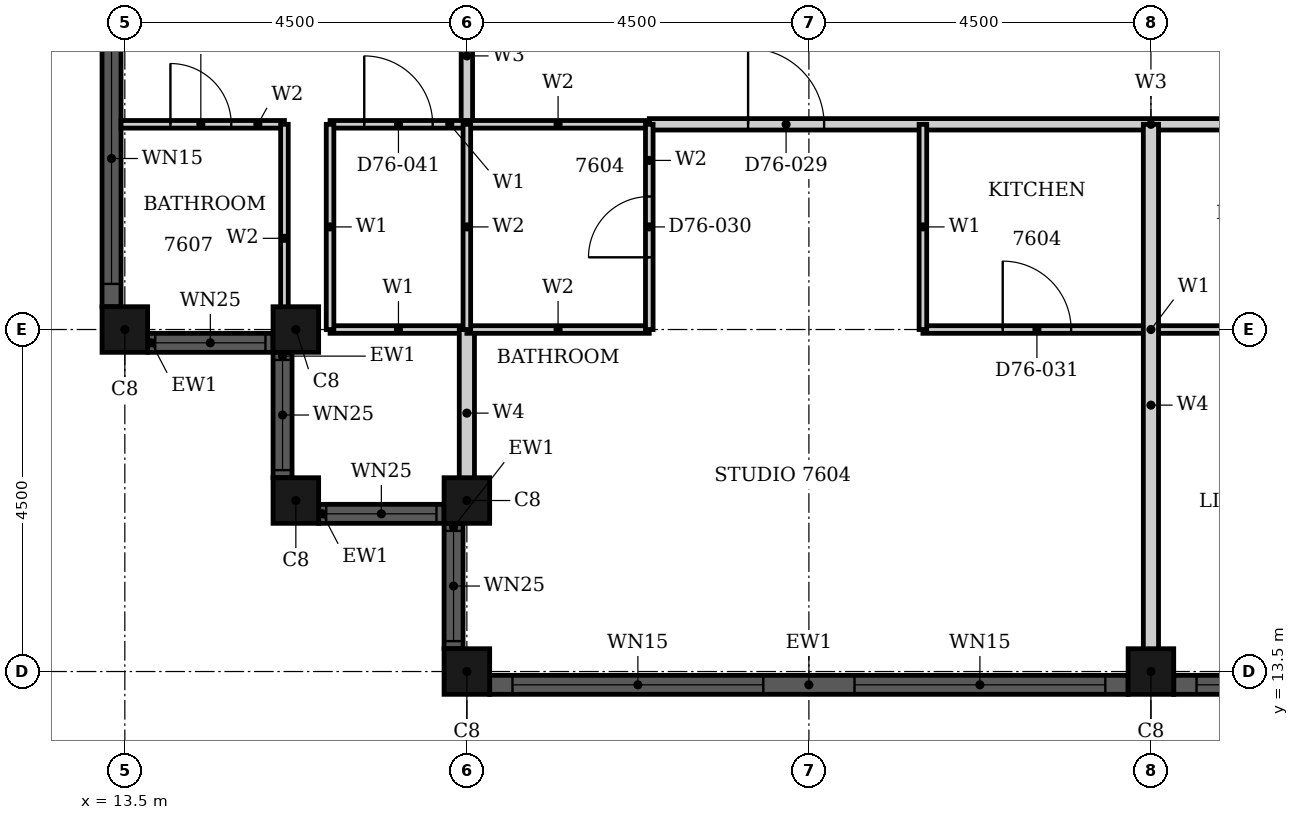
"""IFC4 building model, lengths in metres.
Left out: names, types, materials, properties, quantities, classifications, styles, units other than length and angle.
Written with IfcOpenShell. Run it as: python <this file> out.ifc"""

import sys

from ifc_helpers import new_model, si_unit, direction, frame, frame_2d, origin, origin_2d, place, context, subcontext, project, spatial, rectangle, hollow_rectangle, extrude, element, fill, save


model = new_model("IFC4")
c1 = context("Model", 3, precision=1e-05, world=origin(), true_north=direction((0.0, 1.0)))
c2 = subcontext(c1, "Body", "Model", "MODEL_VIEW")
j1 = project(units=[si_unit("LENGTHUNIT", "METRE"), si_unit("PLANEANGLEUNIT", "RADIAN")], contexts=[c1])
p1 = place(None, origin())
s1 = spatial("IfcSite", under=j1, at=p1, CompositionType="ELEMENT")
p2 = place(p1, origin())
s2 = spatial("IfcBuilding", under=s1, at=p2, CompositionType="ELEMENT")
p3 = place(p2, frame((0.0, 0.0, 298.2)))
s3 = spatial("IfcBuildingStorey", under=s2, at=p3, CompositionType="ELEMENT", Elevation=298.2)
for number, where, z_axis, x_axis in (
    (1, (13.5, 18.0, 0.0), (0.0, 0.0, 1.0), (1.0, 0.0, 0.0)),
    (2, (15.75, 18.0, 0.0), (0.0, 0.0, 1.0), (1.0, 0.0, 0.0)),
    (3, (15.75, 15.75, 0.0), (0.0, 0.0, 1.0), (1.0, 0.0, 0.0)),
    (4, (18.0, 15.75, 0.0), (0.0, 0.0, 1.0), (1.0, 0.0, 0.0)),
    (5, (18.0, 13.5, 0.0), (0.0, 0.0, 1.0), (1.0, 0.0, 0.0)),
    (6, (27.0, 13.5, 0.0), (0.0, 0.0, 1.0), (1.0, 0.0, 0.0)),
):
    element("IfcColumn", number, at=place(p3, frame(where, z_axis=z_axis, x_axis=x_axis)), inside=s3, PredefinedType="COLUMN", context=c2, shape_type="SweptSolid", body=[
        extrude(hollow_rectangle(XDim=0.6, YDim=0.6, WallThickness=0.02, at=origin_2d()), origin(), (0.0, 0.0, 1.0), 3.7),
    ])
p4 = place(p3, frame((13.325, 26.7, 0.0), z_axis=(0.0, 0.0, 1.0), x_axis=(0.0, -1.0, 0.0)))
e7 = element("IfcWall", 7, at=p4, inside=s3, PredefinedType="SOLIDWALL", context=c2, shape_type="SweptSolid", body=[
    extrude(rectangle(XDim=8.4, YDim=0.25, at=frame_2d((4.2, 0.0))), origin(), (0.0, 0.0, 1.0), 3.7),
])
p5 = place(p4, frame((0.3, 0.0, 0.45)))
e8 = element("IfcOpeningElement", 8, at=p5, cuts=e7, PredefinedType="OPENING", context=c2, shape_type="SweptSolid", body=[
    extrude(rectangle(XDim=3.3, YDim=2.3, at=frame_2d((1.65, 1.15))), frame((0.0, 0.135, 0.0), z_axis=(0.0, -1.0, 0.0), x_axis=(1.0, 0.0, 0.0)), (0.0, 0.0, 1.0), 0.27),
])
p6 = place(p4, frame((4.8, 0.0, 0.45)))
e9 = element("IfcOpeningElement", 9, at=p6, cuts=e7, PredefinedType="OPENING", context=c2, shape_type="SweptSolid", body=[
    extrude(rectangle(XDim=3.3, YDim=2.3, at=frame_2d((1.65, 1.15))), frame((0.0, 0.135, 0.0), z_axis=(0.0, -1.0, 0.0), x_axis=(1.0, 0.0, 0.0)), (0.0, 0.0, 1.0), 0.27),
])
p7 = place(p3, frame((13.8, 17.825, 0.0), z_axis=(0.0, 0.0, 1.0), x_axis=(1.0, 0.0, 0.0)))
e10 = element("IfcWall", 10, at=p7, inside=s3, PredefinedType="SOLIDWALL", context=c2, shape_type="SweptSolid", body=[
    extrude(rectangle(XDim=1.65, YDim=0.25, at=frame_2d((0.825, 0.0))), origin(), (0.0, 0.0, 1.0), 3.7),
])
p8 = place(p7, frame((0.1, 0.0, 0.9)))
e11 = element("IfcOpeningElement", 11, at=p8, cuts=e10, PredefinedType="OPENING", context=c2, shape_type="SweptSolid", body=[
    extrude(rectangle(XDim=1.45, YDim=1.85, at=frame_2d((0.725, 0.925))), frame((0.0, 0.135, 0.0), z_axis=(0.0, -1.0, 0.0), x_axis=(1.0, 0.0, 0.0)), (0.0, 0.0, 1.0), 0.27),
])
p9 = place(p3, frame((15.575, 17.7, 0.0), z_axis=(0.0, 0.0, 1.0), x_axis=(0.0, -1.0, 0.0)))
e12 = element("IfcWall", 12, at=p9, inside=s3, PredefinedType="SOLIDWALL", context=c2, shape_type="SweptSolid", body=[
    extrude(rectangle(XDim=1.65, YDim=0.25, at=frame_2d((0.825, 0.0))), origin(), (0.0, 0.0, 1.0), 3.7),
])
p10 = place(p9, frame((0.1, 0.0, 0.9)))
e13 = element("IfcOpeningElement", 13, at=p10, cuts=e12, PredefinedType="OPENING", context=c2, shape_type="SweptSolid", body=[
    extrude(rectangle(XDim=1.45, YDim=1.85, at=frame_2d((0.725, 0.925))), frame((0.0, 0.135, 0.0), z_axis=(0.0, -1.0, 0.0), x_axis=(1.0, 0.0, 0.0)), (0.0, 0.0, 1.0), 0.27),
])
p11 = place(p3, frame((16.05, 15.575, 0.0), z_axis=(0.0, 0.0, 1.0), x_axis=(1.0, 0.0, 0.0)))
e14 = element("IfcWall", 14, at=p11, inside=s3, PredefinedType="SOLIDWALL", context=c2, shape_type="SweptSolid", body=[
    extrude(rectangle(XDim=1.65, YDim=0.25, at=frame_2d((0.825, 0.0))), origin(), (0.0, 0.0, 1.0), 3.7),
])
p12 = place(p11, frame((0.1, 0.0, 0.9)))
e15 = element("IfcOpeningElement", 15, at=p12, cuts=e14, PredefinedType="OPENING", context=c2, shape_type="SweptSolid", body=[
    extrude(rectangle(XDim=1.45, YDim=1.85, at=frame_2d((0.725, 0.925))), frame((0.0, 0.135, 0.0), z_axis=(0.0, -1.0, 0.0), x_axis=(1.0, 0.0, 0.0)), (0.0, 0.0, 1.0), 0.27),
])
p13 = place(p3, frame((17.825, 15.45, 0.0), z_axis=(0.0, 0.0, 1.0), x_axis=(0.0, -1.0, 0.0)))
e16 = element("IfcWall", 16, at=p13, inside=s3, PredefinedType="SOLIDWALL", context=c2, shape_type="SweptSolid", body=[
    extrude(rectangle(XDim=1.65, YDim=0.25, at=frame_2d((0.825, 0.0))), origin(), (0.0, 0.0, 1.0), 3.7),
])
p14 = place(p13, frame((0.1, 0.0, 0.9)))
e17 = element("IfcOpeningElement", 17, at=p14, cuts=e16, PredefinedType="OPENING", context=c2, shape_type="SweptSolid", body=[
    extrude(rectangle(XDim=1.45, YDim=1.85, at=frame_2d((0.725, 0.925))), frame((0.0, 0.135, 0.0), z_axis=(0.0, -1.0, 0.0), x_axis=(1.0, 0.0, 0.0)), (0.0, 0.0, 1.0), 0.27),
])
p15 = place(p3, frame((18.3, 13.325, 0.0), z_axis=(0.0, 0.0, 1.0), x_axis=(1.0, 0.0, 0.0)))
e18 = element("IfcWall", 18, at=p15, inside=s3, PredefinedType="SOLIDWALL", context=c2, shape_type="SweptSolid", body=[
    extrude(rectangle(XDim=8.4, YDim=0.25, at=frame_2d((4.2, 0.0))), origin(), (0.0, 0.0, 1.0), 3.7),
])
p16 = place(p15, frame((0.3, 0.0, 0.45)))
e19 = element("IfcOpeningElement", 19, at=p16, cuts=e18, PredefinedType="OPENING", context=c2, shape_type="SweptSolid", body=[
    extrude(rectangle(XDim=3.3, YDim=2.3, at=frame_2d((1.65, 1.15))), frame((0.0, 0.135, 0.0), z_axis=(0.0, -1.0, 0.0), x_axis=(1.0, 0.0, 0.0)), (0.0, 0.0, 1.0), 0.27),
])
p17 = place(p15, frame((4.8, 0.0, 0.45)))
e20 = element("IfcOpeningElement", 20, at=p17, cuts=e18, PredefinedType="OPENING", context=c2, shape_type="SweptSolid", body=[
    extrude(rectangle(XDim=3.3, YDim=2.3, at=frame_2d((1.65, 1.15))), frame((0.0, 0.135, 0.0), z_axis=(0.0, -1.0, 0.0), x_axis=(1.0, 0.0, 0.0)), (0.0, 0.0, 1.0), 0.27),
])
p18 = place(p3, frame((27.3, 13.325, 0.0), z_axis=(0.0, 0.0, 1.0), x_axis=(1.0, 0.0, 0.0)))
e21 = element("IfcWall", 21, at=p18, inside=s3, PredefinedType="SOLIDWALL", context=c2, shape_type="SweptSolid", body=[
    extrude(rectangle(XDim=8.4, YDim=0.25, at=frame_2d((4.2, 0.0))), origin(), (0.0, 0.0, 1.0), 3.7),
])
p19 = place(p18, frame((0.3, 0.0, 0.45)))
e22 = element("IfcOpeningElement", 22, at=p19, cuts=e21, PredefinedType="OPENING", context=c2, shape_type="SweptSolid", body=[
    extrude(rectangle(XDim=3.3, YDim=2.3, at=frame_2d((1.65, 1.15))), frame((0.0, 0.135, 0.0), z_axis=(0.0, -1.0, 0.0), x_axis=(1.0, 0.0, 0.0)), (0.0, 0.0, 1.0), 0.27),
])
p20 = place(p18, frame((4.8, 0.0, 0.45)))
e23 = element("IfcOpeningElement", 23, at=p20, cuts=e21, PredefinedType="OPENING", context=c2, shape_type="SweptSolid", body=[
    extrude(rectangle(XDim=3.3, YDim=2.3, at=frame_2d((1.65, 1.15))), frame((0.0, 0.135, 0.0), z_axis=(0.0, -1.0, 0.0), x_axis=(1.0, 0.0, 0.0)), (0.0, 0.0, 1.0), 0.27),
])
p21 = place(p3, frame((20.4, 20.7, 0.0), z_axis=(0.0, 0.0, 1.0), x_axis=(1.0, 0.0, 0.0)))
e24 = element("IfcWall", 24, at=p21, inside=s3, PredefinedType="PARTITIONING", context=c2, shape_type="SweptSolid", body=[
    extrude(rectangle(XDim=13.2, YDim=0.15, at=frame_2d((6.6, 0.0))), origin(), (0.0, 0.0, 1.0), 3.4),
])
p22 = place(p21, frame((1.3, 0.0, 0.0)))
e25 = element("IfcOpeningElement", 25, at=p22, cuts=e24, PredefinedType="OPENING", context=c2, shape_type="SweptSolid", body=[
    extrude(rectangle(XDim=1.0, YDim=2.2, at=frame_2d((0.5, 1.1))), frame((0.0, 0.085, 0.0), z_axis=(0.0, -1.0, 0.0), x_axis=(1.0, 0.0, 0.0)), (0.0, 0.0, 1.0), 0.17),
])
p23 = place(p21, frame((10.9, 0.0, 0.0)))
e26 = element("IfcOpeningElement", 26, at=p23, cuts=e24, PredefinedType="OPENING", context=c2, shape_type="SweptSolid", body=[
    extrude(rectangle(XDim=1.0, YDim=2.2, at=frame_2d((0.5, 1.1))), frame((0.0, 0.085, 0.0), z_axis=(0.0, -1.0, 0.0), x_axis=(1.0, 0.0, 0.0)), (0.0, 0.0, 1.0), 0.17),
])
p24 = place(p3, frame((18.0, 20.7, 0.0), z_axis=(0.0, 0.0, 1.0), x_axis=(0.0, 1.0, 0.0)))
e27 = element("IfcWall", 27, at=p24, inside=s3, PredefinedType="PARTITIONING", context=c2, shape_type="SweptSolid", body=[
    extrude(rectangle(XDim=1.8, YDim=0.15, at=frame_2d((0.9, 0.0))), origin(), (0.0, 0.0, 1.0), 3.4),
])
p25 = place(p3, frame((24.0, 18.0, 0.0), z_axis=(0.0, 0.0, 1.0), x_axis=(1.0, 0.0, 0.0)))
e28 = element("IfcWall", 28, at=p25, inside=s3, PredefinedType="PARTITIONING", context=c2, shape_type="SweptSolid", body=[
    extrude(rectangle(XDim=6.0, YDim=0.1, at=frame_2d((3.0, 0.0))), origin(), (0.0, 0.0, 1.0), 3.4),
])
p26 = place(p25, frame((1.05, 0.0, 0.0)))
e29 = element("IfcOpeningElement", 29, at=p26, cuts=e28, PredefinedType="OPENING", context=c2, shape_type="SweptSolid", body=[
    extrude(rectangle(XDim=0.9, YDim=2.1, at=frame_2d((0.45, 1.05))), frame((0.0, 0.06, 0.0), z_axis=(0.0, -1.0, 0.0), x_axis=(1.0, 0.0, 0.0)), (0.0, 0.0, 1.0), 0.12),
])
p27 = place(p25, frame((4.05, 0.0, 0.0)))
e30 = element("IfcOpeningElement", 30, at=p27, cuts=e28, PredefinedType="OPENING", context=c2, shape_type="SweptSolid", body=[
    extrude(rectangle(XDim=0.9, YDim=2.1, at=frame_2d((0.45, 1.05))), frame((0.0, 0.06, 0.0), z_axis=(0.0, -1.0, 0.0), x_axis=(1.0, 0.0, 0.0)), (0.0, 0.0, 1.0), 0.12),
])
p28 = place(p3, frame((16.2, 18.0, 0.0), z_axis=(0.0, 0.0, 1.0), x_axis=(1.0, 0.0, 0.0)))
e31 = element("IfcWall", 31, at=p28, inside=s3, PredefinedType="PARTITIONING", context=c2, shape_type="SweptSolid", body=[
    extrude(rectangle(XDim=1.8, YDim=0.1, at=frame_2d((0.9, 0.0))), origin(), (0.0, 0.0, 1.0), 3.4),
])
p29 = place(p3, frame((16.2, 20.7, 0.0), z_axis=(0.0, 0.0, 1.0), x_axis=(1.0, 0.0, 0.0)))
e32 = element("IfcWall", 32, at=p29, inside=s3, PredefinedType="PARTITIONING", context=c2, shape_type="SweptSolid", body=[
    extrude(rectangle(XDim=1.8, YDim=0.1, at=frame_2d((0.9, 0.0))), origin(), (0.0, 0.0, 1.0), 3.4),
])
p30 = place(p29, frame((0.45, 0.0, 0.0)))
e33 = element("IfcOpeningElement", 33, at=p30, cuts=e32, PredefinedType="OPENING", context=c2, shape_type="SweptSolid", body=[
    extrude(rectangle(XDim=0.9, YDim=2.1, at=frame_2d((0.45, 1.05))), frame((0.0, 0.06, 0.0), z_axis=(0.0, -1.0, 0.0), x_axis=(1.0, 0.0, 0.0)), (0.0, 0.0, 1.0), 0.12),
])
for number, where, z_axis, x_axis in (
    (34, (16.2, 18.0, 0.0), (0.0, 0.0, 1.0), (0.0, 1.0, 0.0)),
    (35, (24.0, 18.0, 0.0), (0.0, 0.0, 1.0), (0.0, 1.0, 0.0)),
):
    element("IfcWall", number, at=place(p3, frame(where, z_axis=z_axis, x_axis=x_axis)), inside=s3, PredefinedType="PARTITIONING", context=c2, shape_type="SweptSolid", body=[
        extrude(rectangle(XDim=2.7, YDim=0.1, at=frame_2d((1.35, 0.0))), origin(), (0.0, 0.0, 1.0), 3.4),
    ])
p31 = place(p3, frame((18.0, 15.8, 0.0), z_axis=(0.0, 0.0, 1.0), x_axis=(0.0, 1.0, 0.0)))
e36 = element("IfcWall", 36, at=p31, inside=s3, PredefinedType="PARTITIONING", context=c2, shape_type="SweptSolid", body=[
    extrude(rectangle(XDim=2.2, YDim=0.2, at=frame_2d((1.1, 0.0))), origin(), (0.0, 0.0, 1.0), 3.4),
])
p32 = place(p3, frame((27.0, 13.31, 0.0), z_axis=(0.0, 0.0, 1.0), x_axis=(0.0, 1.0, 0.0)))
e37 = element("IfcWall", 37, at=p32, inside=s3, PredefinedType="PARTITIONING", context=c2, shape_type="SweptSolid", body=[
    extrude(rectangle(XDim=7.39, YDim=0.2, at=frame_2d((3.695, 0.0))), origin(), (0.0, 0.0, 1.0), 3.4),
])
for number, where, z_axis, x_axis in (
    (38, (18.0, 18.0, 0.0), (0.0, 0.0, 1.0), (1.0, 0.0, 0.0)),
    (39, (18.0, 20.7, 0.0), (0.0, 0.0, 1.0), (1.0, 0.0, 0.0)),
):
    element("IfcWall", number, at=place(p3, frame(where, z_axis=z_axis, x_axis=x_axis)), inside=s3, PredefinedType="PARTITIONING", context=c2, shape_type="SweptSolid", body=[
        extrude(rectangle(XDim=2.4, YDim=0.1, at=frame_2d((1.2, 0.0))), origin(), (0.0, 0.0, 1.0), 3.4),
    ])
p33 = place(p3, frame((13.45, 20.7, 0.0), z_axis=(0.0, 0.0, 1.0), x_axis=(1.0, 0.0, 0.0)))
e40 = element("IfcWall", 40, at=p33, inside=s3, PredefinedType="PARTITIONING", context=c2, shape_type="SweptSolid", body=[
    extrude(rectangle(XDim=2.15, YDim=0.1, at=frame_2d((1.075, 0.0))), origin(), (0.0, 0.0, 1.0), 3.4),
])
p34 = place(p33, frame((0.65, 0.0, 0.0)))
e41 = element("IfcOpeningElement", 41, at=p34, cuts=e40, PredefinedType="OPENING", context=c2, shape_type="SweptSolid", body=[
    extrude(rectangle(XDim=0.8, YDim=2.1, at=frame_2d((0.4, 1.05))), frame((0.0, 0.06, 0.0), z_axis=(0.0, -1.0, 0.0), x_axis=(1.0, 0.0, 0.0)), (0.0, 0.0, 1.0), 0.12),
])
p35 = place(p3, frame((15.6, 17.7, 0.0), z_axis=(0.0, 0.0, 1.0), x_axis=(0.0, 1.0, 0.0)))
e42 = element("IfcWall", 42, at=p35, inside=s3, PredefinedType="PARTITIONING", context=c2, shape_type="SweptSolid", body=[
    extrude(rectangle(XDim=3.0, YDim=0.1, at=frame_2d((1.5, 0.0))), origin(), (0.0, 0.0, 1.0), 3.4),
])
p36 = place(p3, frame((18.0, 18.0, 0.0), z_axis=(0.0, 0.0, 1.0), x_axis=(0.0, 1.0, 0.0)))
e43 = element("IfcWall", 43, at=p36, inside=s3, PredefinedType="PARTITIONING", context=c2, shape_type="SweptSolid", body=[
    extrude(rectangle(XDim=2.7, YDim=0.1, at=frame_2d((1.35, 0.0))), origin(), (0.0, 0.0, 1.0), 3.4),
])
p37 = place(p3, frame((20.4, 18.0, 0.0), z_axis=(0.0, 0.0, 1.0), x_axis=(0.0, 1.0, 0.0)))
e44 = element("IfcWall", 44, at=p37, inside=s3, PredefinedType="PARTITIONING", context=c2, shape_type="SweptSolid", body=[
    extrude(rectangle(XDim=2.7, YDim=0.1, at=frame_2d((1.35, 0.0))), origin(), (0.0, 0.0, 1.0), 3.4),
])
p38 = place(p37, frame((0.95, 0.0, 0.0)))
e45 = element("IfcOpeningElement", 45, at=p38, cuts=e44, PredefinedType="OPENING", context=c2, shape_type="SweptSolid", body=[
    extrude(rectangle(XDim=0.8, YDim=2.1, at=frame_2d((0.4, 1.05))), frame((0.0, 0.06, 0.0), z_axis=(0.0, -1.0, 0.0), x_axis=(1.0, 0.0, 0.0)), (0.0, 0.0, 1.0), 0.12),
])
p39 = place(p6, origin())
e46 = element("IfcWindow", 46, at=p39, inside=s3, PartitioningType="SINGLE_PANEL", PredefinedType="WINDOW", context=c2, shape_type="SweptSolid", body=[
    extrude(rectangle(XDim=3.3, YDim=2.3, at=frame_2d((1.65, 1.15))), frame((0.0, 0.03, 0.0), z_axis=(0.0, -1.0, 0.0), x_axis=(1.0, 0.0, 0.0)), (0.0, 0.0, 1.0), 0.06),
])
fill(e9, e46)
p40 = place(p8, origin())
e47 = element("IfcWindow", 47, at=p40, inside=s3, PartitioningType="SINGLE_PANEL", PredefinedType="WINDOW", context=c2, shape_type="SweptSolid", body=[
    extrude(rectangle(XDim=1.45, YDim=1.85, at=frame_2d((0.725, 0.925))), frame((0.0, 0.03, 0.0), z_axis=(0.0, -1.0, 0.0), x_axis=(1.0, 0.0, 0.0)), (0.0, 0.0, 1.0), 0.06),
])
fill(e11, e47)
p41 = place(p10, origin())
e48 = element("IfcWindow", 48, at=p41, inside=s3, PartitioningType="SINGLE_PANEL", PredefinedType="WINDOW", context=c2, shape_type="SweptSolid", body=[
    extrude(rectangle(XDim=1.45, YDim=1.85, at=frame_2d((0.725, 0.925))), frame((0.0, 0.03, 0.0), z_axis=(0.0, -1.0, 0.0), x_axis=(1.0, 0.0, 0.0)), (0.0, 0.0, 1.0), 0.06),
])
fill(e13, e48)
p42 = place(p12, origin())
e49 = element("IfcWindow", 49, at=p42, inside=s3, PartitioningType="SINGLE_PANEL", PredefinedType="WINDOW", context=c2, shape_type="SweptSolid", body=[
    extrude(rectangle(XDim=1.45, YDim=1.85, at=frame_2d((0.725, 0.925))), frame((0.0, 0.03, 0.0), z_axis=(0.0, -1.0, 0.0), x_axis=(1.0, 0.0, 0.0)), (0.0, 0.0, 1.0), 0.06),
])
fill(e15, e49)
p43 = place(p14, origin())
e50 = element("IfcWindow", 50, at=p43, inside=s3, PartitioningType="SINGLE_PANEL", PredefinedType="WINDOW", context=c2, shape_type="SweptSolid", body=[
    extrude(rectangle(XDim=1.45, YDim=1.85, at=frame_2d((0.725, 0.925))), frame((0.0, 0.03, 0.0), z_axis=(0.0, -1.0, 0.0), x_axis=(1.0, 0.0, 0.0)), (0.0, 0.0, 1.0), 0.06),
])
fill(e17, e50)
p44 = place(p16, origin())
e51 = element("IfcWindow", 51, at=p44, inside=s3, PartitioningType="SINGLE_PANEL", PredefinedType="WINDOW", context=c2, shape_type="SweptSolid", body=[
    extrude(rectangle(XDim=3.3, YDim=2.3, at=frame_2d((1.65, 1.15))), frame((0.0, 0.03, 0.0), z_axis=(0.0, -1.0, 0.0), x_axis=(1.0, 0.0, 0.0)), (0.0, 0.0, 1.0), 0.06),
])
fill(e19, e51)
p45 = place(p17, origin())
e52 = element("IfcWindow", 52, at=p45, inside=s3, PartitioningType="SINGLE_PANEL", PredefinedType="WINDOW", context=c2, shape_type="SweptSolid", body=[
    extrude(rectangle(XDim=3.3, YDim=2.3, at=frame_2d((1.65, 1.15))), frame((0.0, 0.03, 0.0), z_axis=(0.0, -1.0, 0.0), x_axis=(1.0, 0.0, 0.0)), (0.0, 0.0, 1.0), 0.06),
])
fill(e20, e52)
p46 = place(p19, origin())
e53 = element("IfcWindow", 53, at=p46, inside=s3, PartitioningType="SINGLE_PANEL", PredefinedType="WINDOW", context=c2, shape_type="SweptSolid", body=[
    extrude(rectangle(XDim=3.3, YDim=2.3, at=frame_2d((1.65, 1.15))), frame((0.0, 0.03, 0.0), z_axis=(0.0, -1.0, 0.0), x_axis=(1.0, 0.0, 0.0)), (0.0, 0.0, 1.0), 0.06),
])
fill(e22, e53)
p47 = place(p22, origin())
e54 = element("IfcDoor", 54, at=p47, inside=s3, OperationType="SINGLE_SWING_RIGHT", PredefinedType="DOOR", context=c2, shape_type="SweptSolid", body=[
    extrude(rectangle(XDim=1.0, YDim=2.2, at=frame_2d((0.5, 1.1))), frame((0.0, 0.025, 0.0), z_axis=(0.0, -1.0, 0.0), x_axis=(1.0, 0.0, 0.0)), (0.0, 0.0, 1.0), 0.05),
])
fill(e25, e54)
p48 = place(p38, origin())
e55 = element("IfcDoor", 55, at=p48, inside=s3, OperationType="SINGLE_SWING_LEFT", PredefinedType="DOOR", context=c2, shape_type="SweptSolid", body=[
    extrude(rectangle(XDim=0.8, YDim=2.1, at=frame_2d((0.4, 1.05))), frame((0.0, 0.025, 0.0), z_axis=(0.0, -1.0, 0.0), x_axis=(1.0, 0.0, 0.0)), (0.0, 0.0, 1.0), 0.05),
])
fill(e45, e55)
p49 = place(p26, origin())
e56 = element("IfcDoor", 56, at=p49, inside=s3, OperationType="SINGLE_SWING_RIGHT", PredefinedType="DOOR", context=c2, shape_type="SweptSolid", body=[
    extrude(rectangle(XDim=0.9, YDim=2.1, at=frame_2d((0.45, 1.05))), frame((0.0, 0.025, 0.0), z_axis=(0.0, -1.0, 0.0), x_axis=(1.0, 0.0, 0.0)), (0.0, 0.0, 1.0), 0.05),
])
fill(e29, e56)
p50 = place(p34, origin())
e57 = element("IfcDoor", 57, at=p50, inside=s3, OperationType="SINGLE_SWING_RIGHT", PredefinedType="DOOR", context=c2, shape_type="SweptSolid", body=[
    extrude(rectangle(XDim=0.8, YDim=2.1, at=frame_2d((0.4, 1.05))), frame((0.0, 0.025, 0.0), z_axis=(0.0, -1.0, 0.0), x_axis=(1.0, 0.0, 0.0)), (0.0, 0.0, 1.0), 0.05),
])
fill(e41, e57)
p51 = place(p30, origin())
e58 = element("IfcDoor", 58, at=p51, inside=s3, OperationType="SINGLE_SWING_LEFT", PredefinedType="DOOR", context=c2, shape_type="SweptSolid", body=[
    extrude(rectangle(XDim=0.9, YDim=2.1, at=frame_2d((0.45, 1.05))), frame((0.0, 0.025, 0.0), z_axis=(0.0, -1.0, 0.0), x_axis=(1.0, 0.0, 0.0)), (0.0, 0.0, 1.0), 0.05),
])
fill(e33, e58)
save(model, sys.argv[1])
